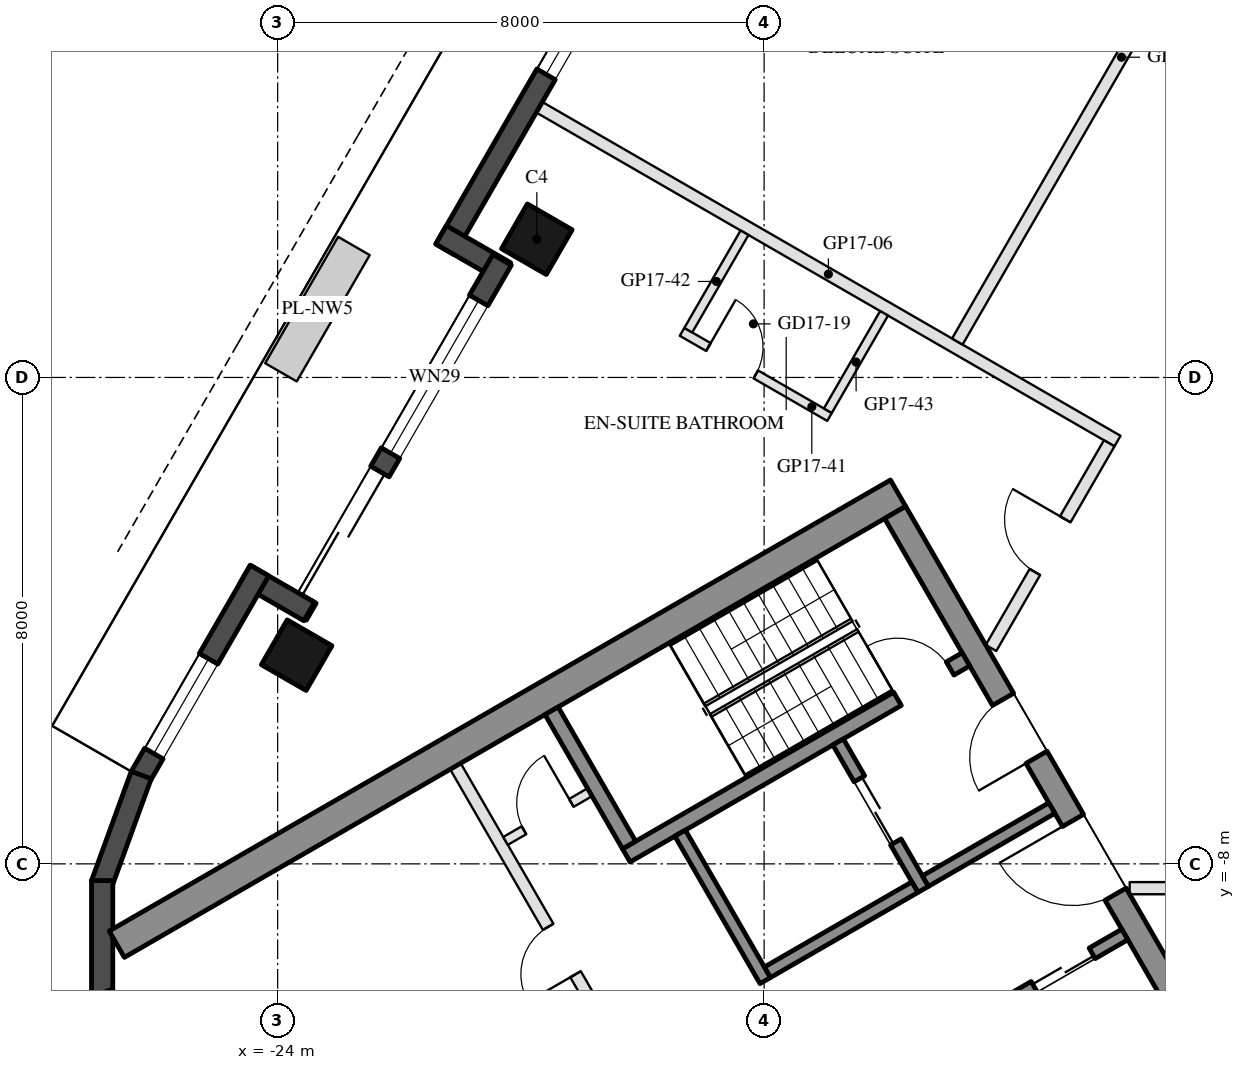
"""IFC4 building model, lengths in metres.
Left out: names, types, materials, properties, quantities, classifications, styles, units other than length and angle.
Written with IfcOpenShell. Run it as: python <this file> out.ifc"""

import sys

from ifc_helpers import new_model, si_unit, direction, frame, frame_2d, origin, origin_2d, place, context, subcontext, project, spatial, rectangle, hollow_rectangle, extrude, element, fill, save


model = new_model("IFC4")
c1 = context("Model", 3, precision=1e-05, world=origin(), true_north=direction((0.0, 1.0)))
c2 = subcontext(c1, "Body", "Model", "MODEL_VIEW")
j1 = project(units=[si_unit("LENGTHUNIT", "METRE"), si_unit("PLANEANGLEUNIT", "RADIAN")], contexts=[c1])
p1 = place(None, origin())
s1 = spatial("IfcSite", under=j1, at=p1, CompositionType="ELEMENT")
p2 = place(p1, origin())
s2 = spatial("IfcBuilding", under=s1, at=p2, CompositionType="ELEMENT")
p3 = place(p2, frame((0.0, 0.0, 183.6)))
s3 = spatial("IfcBuildingStorey", under=s2, at=p3, CompositionType="ELEMENT", Elevation=183.6)
for number, where, z_axis, x_axis in (
    (1, (-19.738, 2.273, 0.0), (0.0, 0.0, 1.0), (0.5, 0.866, 0.0)),
    (2, (-23.688, -4.568, 0.0), (0.0, 0.0, 1.0), (0.5, 0.866, 0.0)),
):
    element("IfcColumn", number, at=place(p3, frame(where, z_axis=z_axis, x_axis=x_axis)), inside=s3, PredefinedType="COLUMN", context=c2, shape_type="SweptSolid", body=[
        extrude(hollow_rectangle(XDim=0.85, YDim=0.85, WallThickness=0.04, at=origin_2d()), origin(), (0.0, 0.0, 1.0), 3.7),
    ])
p4 = place(p3, frame((-16.398, 10.507, 0.0), z_axis=(0.0, 0.0, 1.0), x_axis=(-0.499999142773, -0.866025898704, 0.0)))
e3 = element("IfcWall", 3, at=p4, inside=s3, PredefinedType="SOLIDWALL", context=c2, shape_type="SweptSolid", body=[
    extrude(rectangle(XDim=9.7, YDim=0.35, at=frame_2d((4.85, 0.0))), origin(), (0.0, 0.0, 1.0), 3.55),
])
p5 = place(p4, frame((1.675, 0.0, 0.0)))
e4 = element("IfcOpeningElement", 4, at=p5, cuts=e3, PredefinedType="OPENING", context=c2, shape_type="SweptSolid", body=[
    extrude(rectangle(XDim=2.4, YDim=2.4, at=frame_2d((1.2, 1.2))), frame((0.0, 0.185, 0.0), z_axis=(0.0, -1.0, 0.0), x_axis=(1.0, 0.0, 0.0)), (0.0, 0.0, 1.0), 0.37),
])
p6 = place(p4, frame((4.375, 0.0, 0.3)))
e5 = element("IfcOpeningElement", 5, at=p6, cuts=e3, PredefinedType="OPENING", context=c2, shape_type="SweptSolid", body=[
    extrude(rectangle(XDim=2.0, YDim=2.65, at=frame_2d((1.0, 1.325))), frame((0.0, 0.185, 0.0), z_axis=(0.0, -1.0, 0.0), x_axis=(1.0, 0.0, 0.0)), (0.0, 0.0, 1.0), 0.37),
])
p7 = place(p3, frame((-21.312, 2.346, 0.0), z_axis=(0.0, 0.0, 1.0), x_axis=(0.866005645448, -0.500034220881, 0.0)))
e6 = element("IfcWall", 6, at=p7, inside=s3, PredefinedType="SOLIDWALL", context=c2, shape_type="SweptSolid", body=[
    extrude(rectangle(XDim=1.22, YDim=0.35, at=frame_2d((0.61, 0.0))), origin(), (0.0, 0.0, 1.0), 3.55),
])
p8 = place(p3, frame((-20.309, 1.934, 0.0), z_axis=(0.0, 0.0, 1.0), x_axis=(-0.499992114976, -0.866029956157, 0.0)))
e7 = element("IfcWall", 7, at=p8, inside=s3, PredefinedType="SOLIDWALL", context=c2, shape_type="SweptSolid", body=[
    extrude(rectangle(XDim=6.74, YDim=0.35, at=frame_2d((3.37, 0.0))), origin(), (0.0, 0.0, 1.0), 3.55),
])
p9 = place(p8, frame((4.02, 0.0, 0.0)))
e8 = element("IfcOpeningElement", 8, at=p9, cuts=e7, PredefinedType="OPENING", context=c2, shape_type="SweptSolid", body=[
    extrude(rectangle(XDim=2.4, YDim=2.4, at=frame_2d((1.2, 1.2))), frame((0.0, 0.185, 0.0), z_axis=(0.0, -1.0, 0.0), x_axis=(1.0, 0.0, 0.0)), (0.0, 0.0, 1.0), 0.37),
])
p10 = place(p8, frame((0.77, 0.0, 0.3)))
e9 = element("IfcOpeningElement", 9, at=p10, cuts=e7, PredefinedType="OPENING", context=c2, shape_type="SweptSolid", body=[
    extrude(rectangle(XDim=2.9, YDim=2.65, at=frame_2d((1.45, 1.325))), frame((0.0, 0.185, 0.0), z_axis=(0.0, -1.0, 0.0), x_axis=(1.0, 0.0, 0.0)), (0.0, 0.0, 1.0), 0.37),
])
p11 = place(p3, frame((-23.481, -3.85, 0.0), z_axis=(0.0, 0.0, 1.0), x_axis=(-0.866092288191, 0.499884134912, 0.0)))
e10 = element("IfcWall", 10, at=p11, inside=s3, PredefinedType="SOLIDWALL", context=c2, shape_type="SweptSolid", body=[
    extrude(rectangle(XDim=1.22, YDim=0.35, at=frame_2d((0.61, 0.0))), origin(), (0.0, 0.0, 1.0), 3.55),
])
p12 = place(p3, frame((-24.299, -3.176, 0.0), z_axis=(0.0, 0.0, 1.0), x_axis=(-0.500028278809, -0.866009076391, 0.0)))
e11 = element("IfcWall", 11, at=p12, inside=s3, PredefinedType="SOLIDWALL", context=c2, shape_type="SweptSolid", body=[
    extrude(rectangle(XDim=3.916, YDim=0.35, at=frame_2d((1.958, 0.0))), origin(), (0.0, 0.0, 1.0), 3.55),
])
p13 = place(p12, frame((1.675, 0.0, 0.3)))
e12 = element("IfcOpeningElement", 12, at=p13, cuts=e11, PredefinedType="OPENING", context=c2, shape_type="SweptSolid", body=[
    extrude(rectangle(XDim=1.8, YDim=2.65, at=frame_2d((0.9, 1.325))), frame((0.0, 0.185, 0.0), z_axis=(0.0, -1.0, 0.0), x_axis=(1.0, 0.0, 0.0)), (0.0, 0.0, 1.0), 0.37),
])
for number, where, z_axis, x_axis in (
    (13, (-26.244, -6.54, 0.0), (0.0, 0.0, 1.0), (-0.342, -0.94, 0.0)),
    (14, (-26.886, -8.275, 0.0), (0.0, 0.0, 1.0), (0.0, -1.0, 0.0)),
    (15, (-26.897, -10.125, 0.0), (0.0, 0.0, 1.0), (0.342, -0.94, 0.0)),
):
    element("IfcWall", number, at=place(p3, frame(where, z_axis=z_axis, x_axis=x_axis)), inside=s3, PredefinedType="SOLIDWALL", context=c2, shape_type="SweptSolid", body=[
        extrude(rectangle(XDim=1.91, YDim=0.35, at=frame_2d((0.955, 0.0))), origin(), (0.0, 0.0, 1.0), 3.55),
    ])
p14 = place(p3, frame((-13.797, -1.903, 0.0), z_axis=(0.0, 0.0, 1.0), x_axis=(-0.866025009528, -0.500000682871, 0.0)))
e16 = element("IfcWall", 16, at=p14, inside=s3, PredefinedType="SHEAR", context=c2, shape_type="SweptSolid", body=[
    extrude(rectangle(XDim=14.837, YDim=0.5, at=frame_2d((7.418, 0.0))), origin(), (0.0, 0.0, 1.0), 3.5),
])
p15 = place(p3, frame((-13.845, -2.22, 0.0), z_axis=(0.0, 0.0, 1.0), x_axis=(0.500004234368, -0.866022959057, 0.0)))
e17 = element("IfcWall", 17, at=p15, inside=s3, PredefinedType="SHEAR", context=c2, shape_type="SweptSolid", body=[
    extrude(rectangle(XDim=10.0, YDim=0.4, at=frame_2d((5.0, 0.0))), origin(), (0.0, 0.0, 1.0), 3.5),
])
p16 = place(p15, frame((3.55, 0.0, 0.0)))
e18 = element("IfcOpeningElement", 18, at=p16, cuts=e17, PredefinedType="OPENING", context=c2, shape_type="SweptSolid", body=[
    extrude(rectangle(XDim=1.1, YDim=2.1, at=frame_2d((0.55, 1.05))), frame((0.0, 0.21, 0.0), z_axis=(0.0, -1.0, 0.0), x_axis=(1.0, 0.0, 0.0)), (0.0, 0.0, 1.0), 0.42),
])
p17 = place(p15, frame((5.85, 0.0, 0.0)))
e19 = element("IfcOpeningElement", 19, at=p17, cuts=e17, PredefinedType="OPENING", context=c2, shape_type="SweptSolid", body=[
    extrude(rectangle(XDim=1.4, YDim=2.1, at=frame_2d((0.7, 1.05))), frame((0.0, 0.21, 0.0), z_axis=(0.0, -1.0, 0.0), x_axis=(1.0, 0.0, 0.0)), (0.0, 0.0, 1.0), 0.42),
])
p18 = place(p3, frame((-12.681, -4.636, 0.0), z_axis=(0.0, 0.0, 1.0), x_axis=(-0.866021702275, -0.500006411147, 0.0)))
e20 = element("IfcWall", 20, at=p18, inside=s3, PredefinedType="SHEAR", context=c2, shape_type="SweptSolid", body=[
    extrude(rectangle(XDim=6.45, YDim=0.25, at=frame_2d((3.225, 0.0))), origin(), (0.0, 0.0, 1.0), 3.5),
])
p19 = place(p18, frame((0.3, 0.0, 0.0)))
e21 = element("IfcOpeningElement", 21, at=p19, cuts=e20, PredefinedType="OPENING", context=c2, shape_type="SweptSolid", body=[
    extrude(rectangle(XDim=1.0, YDim=2.1, at=frame_2d((0.5, 1.05))), frame((0.0, 0.135, 0.0), z_axis=(0.0, -1.0, 0.0), x_axis=(1.0, 0.0, 0.0)), (0.0, 0.0, 1.0), 0.27),
])
p20 = place(p3, frame((-19.496, -5.482, 0.0), z_axis=(0.0, 0.0, 1.0), x_axis=(0.499990435942, -0.866030925526, 0.0)))
e22 = element("IfcWall", 22, at=p20, inside=s3, PredefinedType="SHEAR", context=c2, shape_type="SweptSolid", body=[
    extrude(rectangle(XDim=2.55, YDim=0.25, at=frame_2d((1.275, 0.0))), origin(), (0.0, 0.0, 1.0), 3.5),
])
p21 = place(p3, frame((-17.381, -7.495, 0.0), z_axis=(0.0, 0.0, 1.0), x_axis=(0.500011755427, -0.866018616679, 0.0)))
e23 = element("IfcWall", 23, at=p21, inside=s3, PredefinedType="SHEAR", context=c2, shape_type="SweptSolid", body=[
    extrude(rectangle(XDim=2.8, YDim=0.2, at=frame_2d((1.4, 0.0))), origin(), (0.0, 0.0, 1.0), 3.5),
])
p22 = place(p3, frame((-14.783, -5.995, 0.0), z_axis=(0.0, 0.0, 1.0), x_axis=(0.49994636267, -0.866056369097, 0.0)))
e24 = element("IfcWall", 24, at=p22, inside=s3, PredefinedType="SHEAR", context=c2, shape_type="SweptSolid", body=[
    extrude(rectangle(XDim=2.8, YDim=0.2, at=frame_2d((1.4, 0.0))), origin(), (0.0, 0.0, 1.0), 3.5),
])
p23 = place(p22, frame((0.7, 0.0, 0.0)))
e25 = element("IfcOpeningElement", 25, at=p23, cuts=e24, PredefinedType="OPENING", context=c2, shape_type="SweptSolid", body=[
    extrude(rectangle(XDim=1.2, YDim=2.1, at=frame_2d((0.6, 1.05))), frame((0.0, 0.11, 0.0), z_axis=(0.0, -1.0, 0.0), x_axis=(1.0, 0.0, 0.0)), (0.0, 0.0, 1.0), 0.22),
])
p24 = place(p3, frame((-13.52, -8.383, 0.0), z_axis=(0.0, 0.0, 1.0), x_axis=(-0.866034573852, -0.49998411664, 0.0)))
e26 = element("IfcWall", 26, at=p24, inside=s3, PredefinedType="SHEAR", context=c2, shape_type="SweptSolid", body=[
    extrude(rectangle(XDim=2.8, YDim=0.2, at=frame_2d((1.4, 0.0))), origin(), (0.0, 0.0, 1.0), 3.5),
])
p25 = place(p3, frame((-11.268, -7.083, 0.0), z_axis=(0.0, 0.0, 1.0), x_axis=(-0.866050077142, -0.499957262057, 0.0)))
e27 = element("IfcWall", 27, at=p25, inside=s3, PredefinedType="SHEAR", context=c2, shape_type="SweptSolid", body=[
    extrude(rectangle(XDim=2.4, YDim=0.2, at=frame_2d((1.2, 0.0))), origin(), (0.0, 0.0, 1.0), 3.5),
])
p26 = place(p3, frame((-10.068, -9.162, 0.0), z_axis=(0.0, 0.0, 1.0), x_axis=(-0.866032725843, -0.499987317609, 0.0)))
e28 = element("IfcWall", 28, at=p26, inside=s3, PredefinedType="SHEAR", context=c2, shape_type="SweptSolid", body=[
    extrude(rectangle(XDim=10.16, YDim=0.2, at=frame_2d((5.08, 0.0))), origin(), (0.0, 0.0, 1.0), 3.5),
])
p27 = place(p26, frame((0.62, 0.0, 0.0)))
e29 = element("IfcOpeningElement", 29, at=p27, cuts=e28, PredefinedType="OPENING", context=c2, shape_type="SweptSolid", body=[
    extrude(rectangle(XDim=1.1, YDim=2.1, at=frame_2d((0.55, 1.05))), frame((0.0, 0.11, 0.0), z_axis=(0.0, -1.0, 0.0), x_axis=(1.0, 0.0, 0.0)), (0.0, 0.0, 1.0), 0.22),
])
p28 = place(p26, frame((3.16, 0.0, 0.0)))
e30 = element("IfcOpeningElement", 30, at=p28, cuts=e28, PredefinedType="OPENING", context=c2, shape_type="SweptSolid", body=[
    extrude(rectangle(XDim=1.1, YDim=2.1, at=frame_2d((0.55, 1.05))), frame((0.0, 0.11, 0.0), z_axis=(0.0, -1.0, 0.0), x_axis=(1.0, 0.0, 0.0)), (0.0, 0.0, 1.0), 0.22),
])
p29 = place(p26, frame((5.7, 0.0, 0.0)))
e31 = element("IfcOpeningElement", 31, at=p29, cuts=e28, PredefinedType="OPENING", context=c2, shape_type="SweptSolid", body=[
    extrude(rectangle(XDim=1.1, YDim=2.1, at=frame_2d((0.55, 1.05))), frame((0.0, 0.11, 0.0), z_axis=(0.0, -1.0, 0.0), x_axis=(1.0, 0.0, 0.0)), (0.0, 0.0, 1.0), 0.22),
])
p30 = place(p26, frame((8.24, 0.0, 0.0)))
e32 = element("IfcOpeningElement", 32, at=p30, cuts=e28, PredefinedType="OPENING", context=c2, shape_type="SweptSolid", body=[
    extrude(rectangle(XDim=1.1, YDim=2.1, at=frame_2d((0.55, 1.05))), frame((0.0, 0.11, 0.0), z_axis=(0.0, -1.0, 0.0), x_axis=(1.0, 0.0, 0.0)), (0.0, 0.0, 1.0), 0.22),
])
p31 = place(p3, frame((-21.076, -6.395, 0.0), z_axis=(0.0, 0.0, 1.0), x_axis=(0.50001468107, -0.866016927499, 0.0)))
e33 = element("IfcWall", 33, at=p31, inside=s3, PredefinedType="PARTITIONING", context=c2, shape_type="SweptSolid", body=[
    extrude(rectangle(XDim=5.4, YDim=0.2, at=frame_2d((2.7, 0.0))), origin(), (0.0, 0.0, 1.0), 3.5),
])
p32 = place(p31, frame((3.05, 0.0, 0.0)))
e34 = element("IfcOpeningElement", 34, at=p32, cuts=e33, PredefinedType="OPENING", context=c2, shape_type="SweptSolid", body=[
    extrude(rectangle(XDim=0.9, YDim=2.1, at=frame_2d((0.45, 1.05))), frame((0.0, 0.11, 0.0), z_axis=(0.0, -1.0, 0.0), x_axis=(1.0, 0.0, 0.0)), (0.0, 0.0, 1.0), 0.22),
])
p33 = place(p3, frame((-18.866, -6.822, 0.0), z_axis=(0.0, 0.0, 1.0), x_axis=(-0.866028054938, -0.499995408039, 0.0)))
e35 = element("IfcWall", 35, at=p33, inside=s3, PredefinedType="PARTITIONING", context=c2, shape_type="SweptSolid", body=[
    extrude(rectangle(XDim=1.6, YDim=0.15, at=frame_2d((0.8, 0.0))), origin(), (0.0, 0.0, 1.0), 3.5),
])
p34 = place(p33, frame((0.35, 0.0, 0.0)))
e36 = element("IfcOpeningElement", 36, at=p34, cuts=e35, PredefinedType="OPENING", context=c2, shape_type="SweptSolid", body=[
    extrude(rectangle(XDim=0.9, YDim=2.1, at=frame_2d((0.45, 1.05))), frame((0.0, 0.085, 0.0), z_axis=(0.0, -1.0, 0.0), x_axis=(1.0, 0.0, 0.0)), (0.0, 0.0, 1.0), 0.17),
])
p35 = place(p3, frame((-19.697, 4.444, 0.0), z_axis=(0.0, 0.0, 1.0), x_axis=(0.866027479907, -0.499996404033, 0.0)))
e37 = element("IfcWall", 37, at=p35, inside=s3, PredefinedType="PARTITIONING", context=c2, shape_type="SweptSolid", body=[
    extrude(rectangle(XDim=10.98, YDim=0.2, at=frame_2d((5.49, 0.0))), origin(), (0.0, 0.0, 1.0), 3.06),
])
p36 = place(p3, frame((-3.803, -8.4, 0.0), z_axis=(0.0, 0.0, 1.0), x_axis=(-1.0, 0.0, 0.0)))
e38 = element("IfcWall", 38, at=p36, inside=s3, PredefinedType="PARTITIONING", context=c2, shape_type="SweptSolid", body=[
    extrude(rectangle(XDim=6.185, YDim=0.2, at=frame_2d((3.092, 0.0))), origin(), (0.0, 0.0, 1.0), 2.95),
])
p37 = place(p36, frame((2.592, 0.0, 0.0)))
e39 = element("IfcOpeningElement", 39, at=p37, cuts=e38, PredefinedType="OPENING", context=c2, shape_type="SweptSolid", body=[
    extrude(rectangle(XDim=1.0, YDim=2.1, at=frame_2d((0.5, 1.05))), frame((0.0, 0.11, 0.0), z_axis=(0.0, -1.0, 0.0), x_axis=(1.0, 0.0, 0.0)), (0.0, 0.0, 1.0), 0.22),
])
p38 = place(p3, frame((-12.823, 0.591, 0.0), z_axis=(0.0, 0.0, 1.0), x_axis=(0.500012057535, 0.866018442252, 0.0)))
e40 = element("IfcWall", 40, at=p38, inside=s3, PredefinedType="PARTITIONING", context=c2, shape_type="SweptSolid", body=[
    extrude(rectangle(XDim=10.8, YDim=0.2, at=frame_2d((5.4, 0.0))), origin(), (0.0, 0.0, 1.0), 2.95),
])
p39 = place(p38, frame((7.35, 0.0, 0.0)))
e41 = element("IfcOpeningElement", 41, at=p39, cuts=e40, PredefinedType="OPENING", context=c2, shape_type="SweptSolid", body=[
    extrude(rectangle(XDim=1.0, YDim=2.1, at=frame_2d((0.5, 1.05))), frame((0.0, 0.11, 0.0), z_axis=(0.0, -1.0, 0.0), x_axis=(1.0, 0.0, 0.0)), (0.0, 0.0, 1.0), 0.22),
])
p40 = place(p3, frame((-12.269, -4.45, 0.0), z_axis=(0.0, 0.0, 1.0), x_axis=(0.500008716408, 0.866020371305, 0.0)))
e42 = element("IfcWall", 42, at=p40, inside=s3, PredefinedType="PARTITIONING", context=c2, shape_type="SweptSolid", body=[
    extrude(rectangle(XDim=3.888, YDim=0.2, at=frame_2d((1.944, 0.0))), origin(), (0.0, 0.0, 1.0), 2.95),
])
p41 = place(p40, frame((1.444, 0.0, 0.0)))
e43 = element("IfcOpeningElement", 43, at=p41, cuts=e42, PredefinedType="OPENING", context=c2, shape_type="SweptSolid", body=[
    extrude(rectangle(XDim=1.0, YDim=2.1, at=frame_2d((0.5, 1.05))), frame((0.0, 0.11, 0.0), z_axis=(0.0, -1.0, 0.0), x_axis=(1.0, 0.0, 0.0)), (0.0, 0.0, 1.0), 0.22),
])
p42 = place(p3, frame((-17.349, 0.75, 0.0), z_axis=(0.0, 0.0, 1.0), x_axis=(0.866056369097, -0.49994636267, 0.0)))
e44 = element("IfcWall", 44, at=p42, inside=s3, PredefinedType="PARTITIONING", context=c2, shape_type="SweptSolid", body=[
    extrude(rectangle(XDim=2.8, YDim=0.15, at=frame_2d((1.4, 0.0))), origin(), (0.0, 0.0, 1.0), 2.95),
])
p43 = place(p42, frame((0.5, 0.0, 0.0)))
e45 = element("IfcOpeningElement", 45, at=p43, cuts=e44, PredefinedType="OPENING", context=c2, shape_type="SweptSolid", body=[
    extrude(rectangle(XDim=0.9, YDim=2.1, at=frame_2d((0.45, 1.05))), frame((0.0, 0.085, 0.0), z_axis=(0.0, -1.0, 0.0), x_axis=(1.0, 0.0, 0.0)), (0.0, 0.0, 1.0), 0.17),
])
for number, where, z_axis, x_axis in (
    (46, (-16.322, 2.38, 0.0), (0.0, 0.0, 1.0), (-0.5, -0.866, 0.0)),
    (47, (-14.027, 1.055, 0.0), (0.0, 0.0, 1.0), (-0.5, -0.866, 0.0)),
):
    element("IfcWall", number, at=place(p3, frame(where, z_axis=z_axis, x_axis=x_axis)), inside=s3, PredefinedType="PARTITIONING", context=c2, shape_type="SweptSolid", body=[
        extrude(rectangle(XDim=1.85, YDim=0.15, at=frame_2d((0.925, 0.0))), origin(), (0.0, 0.0, 1.0), 2.95),
    ])
p44 = place(p6, origin())
e48 = element("IfcWindow", 48, at=p44, inside=s3, PartitioningType="SINGLE_PANEL", PredefinedType="WINDOW", context=c2, shape_type="SweptSolid", body=[
    extrude(rectangle(XDim=2.0, YDim=2.65, at=frame_2d((1.0, 1.325))), frame((0.0, 0.03, 0.0), z_axis=(0.0, -1.0, 0.0), x_axis=(1.0, 0.0, 0.0)), (0.0, 0.0, 1.0), 0.06),
])
fill(e5, e48)
p45 = place(p9, frame((2.4, 0.0, 0.0), z_axis=(0.0, 0.0, 1.0), x_axis=(-1.0, 0.0, 0.0)))
e49 = element("IfcDoor", 49, at=p45, inside=s3, OperationType="SLIDING_TO_LEFT", PredefinedType="DOOR", context=c2, shape_type="SweptSolid", body=[
    extrude(rectangle(XDim=2.4, YDim=2.4, at=frame_2d((1.2, 1.2))), frame((0.0, 0.025, 0.0), z_axis=(0.0, -1.0, 0.0), x_axis=(1.0, 0.0, 0.0)), (0.0, 0.0, 1.0), 0.05),
])
fill(e8, e49)
p46 = place(p10, origin())
e50 = element("IfcWindow", 50, at=p46, inside=s3, PartitioningType="SINGLE_PANEL", PredefinedType="WINDOW", context=c2, shape_type="SweptSolid", body=[
    extrude(rectangle(XDim=2.9, YDim=2.65, at=frame_2d((1.45, 1.325))), frame((0.0, 0.03, 0.0), z_axis=(0.0, -1.0, 0.0), x_axis=(1.0, 0.0, 0.0)), (0.0, 0.0, 1.0), 0.06),
])
fill(e9, e50)
p47 = place(p13, origin())
e51 = element("IfcWindow", 51, at=p47, inside=s3, PartitioningType="SINGLE_PANEL", PredefinedType="WINDOW", context=c2, shape_type="SweptSolid", body=[
    extrude(rectangle(XDim=1.8, YDim=2.65, at=frame_2d((0.9, 1.325))), frame((0.0, 0.03, 0.0), z_axis=(0.0, -1.0, 0.0), x_axis=(1.0, 0.0, 0.0)), (0.0, 0.0, 1.0), 0.06),
])
fill(e12, e51)
p48 = place(p23, origin())
e52 = element("IfcDoor", 52, at=p48, inside=s3, OperationType="DOUBLE_DOOR_SLIDING", PredefinedType="DOOR", context=c2, shape_type="SweptSolid", body=[
    extrude(rectangle(XDim=1.2, YDim=2.1, at=frame_2d((0.6, 1.05))), frame((0.0, 0.025, 0.0), z_axis=(0.0, -1.0, 0.0), x_axis=(1.0, 0.0, 0.0)), (0.0, 0.0, 1.0), 0.05),
])
fill(e25, e52)
p49 = place(p34, frame((0.9, 0.0, 0.0), z_axis=(0.0, 0.0, 1.0), x_axis=(-1.0, 0.0, 0.0)))
e53 = element("IfcDoor", 53, at=p49, inside=s3, OperationType="SINGLE_SWING_RIGHT", PredefinedType="DOOR", context=c2, shape_type="SweptSolid", body=[
    extrude(rectangle(XDim=0.9, YDim=2.1, at=frame_2d((0.45, 1.05))), frame((0.0, 0.025, 0.0), z_axis=(0.0, -1.0, 0.0), x_axis=(1.0, 0.0, 0.0)), (0.0, 0.0, 1.0), 0.05),
])
fill(e36, e53)
p50 = place(p27, origin())
e54 = element("IfcDoor", 54, at=p50, inside=s3, OperationType="DOUBLE_DOOR_SLIDING", PredefinedType="DOOR", context=c2, shape_type="SweptSolid", body=[
    extrude(rectangle(XDim=1.1, YDim=2.1, at=frame_2d((0.55, 1.05))), frame((0.0, 0.025, 0.0), z_axis=(0.0, -1.0, 0.0), x_axis=(1.0, 0.0, 0.0)), (0.0, 0.0, 1.0), 0.05),
])
fill(e29, e54)
p51 = place(p32, frame((0.9, 0.0, 0.0), z_axis=(0.0, 0.0, 1.0), x_axis=(-1.0, 0.0, 0.0)))
e55 = element("IfcDoor", 55, at=p51, inside=s3, OperationType="SINGLE_SWING_LEFT", PredefinedType="DOOR", context=c2, shape_type="SweptSolid", body=[
    extrude(rectangle(XDim=0.9, YDim=2.1, at=frame_2d((0.45, 1.05))), frame((0.0, 0.025, 0.0), z_axis=(0.0, -1.0, 0.0), x_axis=(1.0, 0.0, 0.0)), (0.0, 0.0, 1.0), 0.05),
])
fill(e34, e55)
p52 = place(p16, frame((1.1, 0.0, 0.0), z_axis=(0.0, 0.0, 1.0), x_axis=(-1.0, 0.0, 0.0)))
e56 = element("IfcDoor", 56, at=p52, inside=s3, OperationType="SINGLE_SWING_LEFT", PredefinedType="DOOR", context=c2, shape_type="SweptSolid", body=[
    extrude(rectangle(XDim=1.1, YDim=2.1, at=frame_2d((0.55, 1.05))), frame((0.0, 0.025, 0.0), z_axis=(0.0, -1.0, 0.0), x_axis=(1.0, 0.0, 0.0)), (0.0, 0.0, 1.0), 0.05),
])
fill(e18, e56)
p53 = place(p17, frame((1.4, 0.0, 0.0), z_axis=(0.0, 0.0, 1.0), x_axis=(-1.0, 0.0, 0.0)))
e57 = element("IfcDoor", 57, at=p53, inside=s3, OperationType="DOUBLE_DOOR_SINGLE_SWING", PredefinedType="DOOR", context=c2, shape_type="SweptSolid", body=[
    extrude(rectangle(XDim=1.4, YDim=2.1, at=frame_2d((0.7, 1.05))), frame((0.0, 0.025, 0.0), z_axis=(0.0, -1.0, 0.0), x_axis=(1.0, 0.0, 0.0)), (0.0, 0.0, 1.0), 0.05),
])
fill(e19, e57)
p54 = place(p19, frame((1.0, 0.0, 0.0), z_axis=(0.0, 0.0, 1.0), x_axis=(-1.0, 0.0, 0.0)))
e58 = element("IfcDoor", 58, at=p54, inside=s3, OperationType="SINGLE_SWING_LEFT", PredefinedType="DOOR", context=c2, shape_type="SweptSolid", body=[
    extrude(rectangle(XDim=1.0, YDim=2.1, at=frame_2d((0.5, 1.05))), frame((0.0, 0.025, 0.0), z_axis=(0.0, -1.0, 0.0), x_axis=(1.0, 0.0, 0.0)), (0.0, 0.0, 1.0), 0.05),
])
fill(e21, e58)
p55 = place(p43, origin())
e59 = element("IfcDoor", 59, at=p55, inside=s3, OperationType="SINGLE_SWING_LEFT", PredefinedType="DOOR", context=c2, shape_type="SweptSolid", body=[
    extrude(rectangle(XDim=0.9, YDim=2.1, at=frame_2d((0.45, 1.05))), frame((0.0, 0.025, 0.0), z_axis=(0.0, -1.0, 0.0), x_axis=(1.0, 0.0, 0.0)), (0.0, 0.0, 1.0), 0.05),
])
fill(e45, e59)
p56 = place(p41, origin())
e60 = element("IfcDoor", 60, at=p56, inside=s3, OperationType="SINGLE_SWING_RIGHT", PredefinedType="DOOR", context=c2, shape_type="SweptSolid", body=[
    extrude(rectangle(XDim=1.0, YDim=2.1, at=frame_2d((0.5, 1.05))), frame((0.0, 0.025, 0.0), z_axis=(0.0, -1.0, 0.0), x_axis=(1.0, 0.0, 0.0)), (0.0, 0.0, 1.0), 0.05),
])
fill(e43, e60)
save(model, sys.argv[1])
